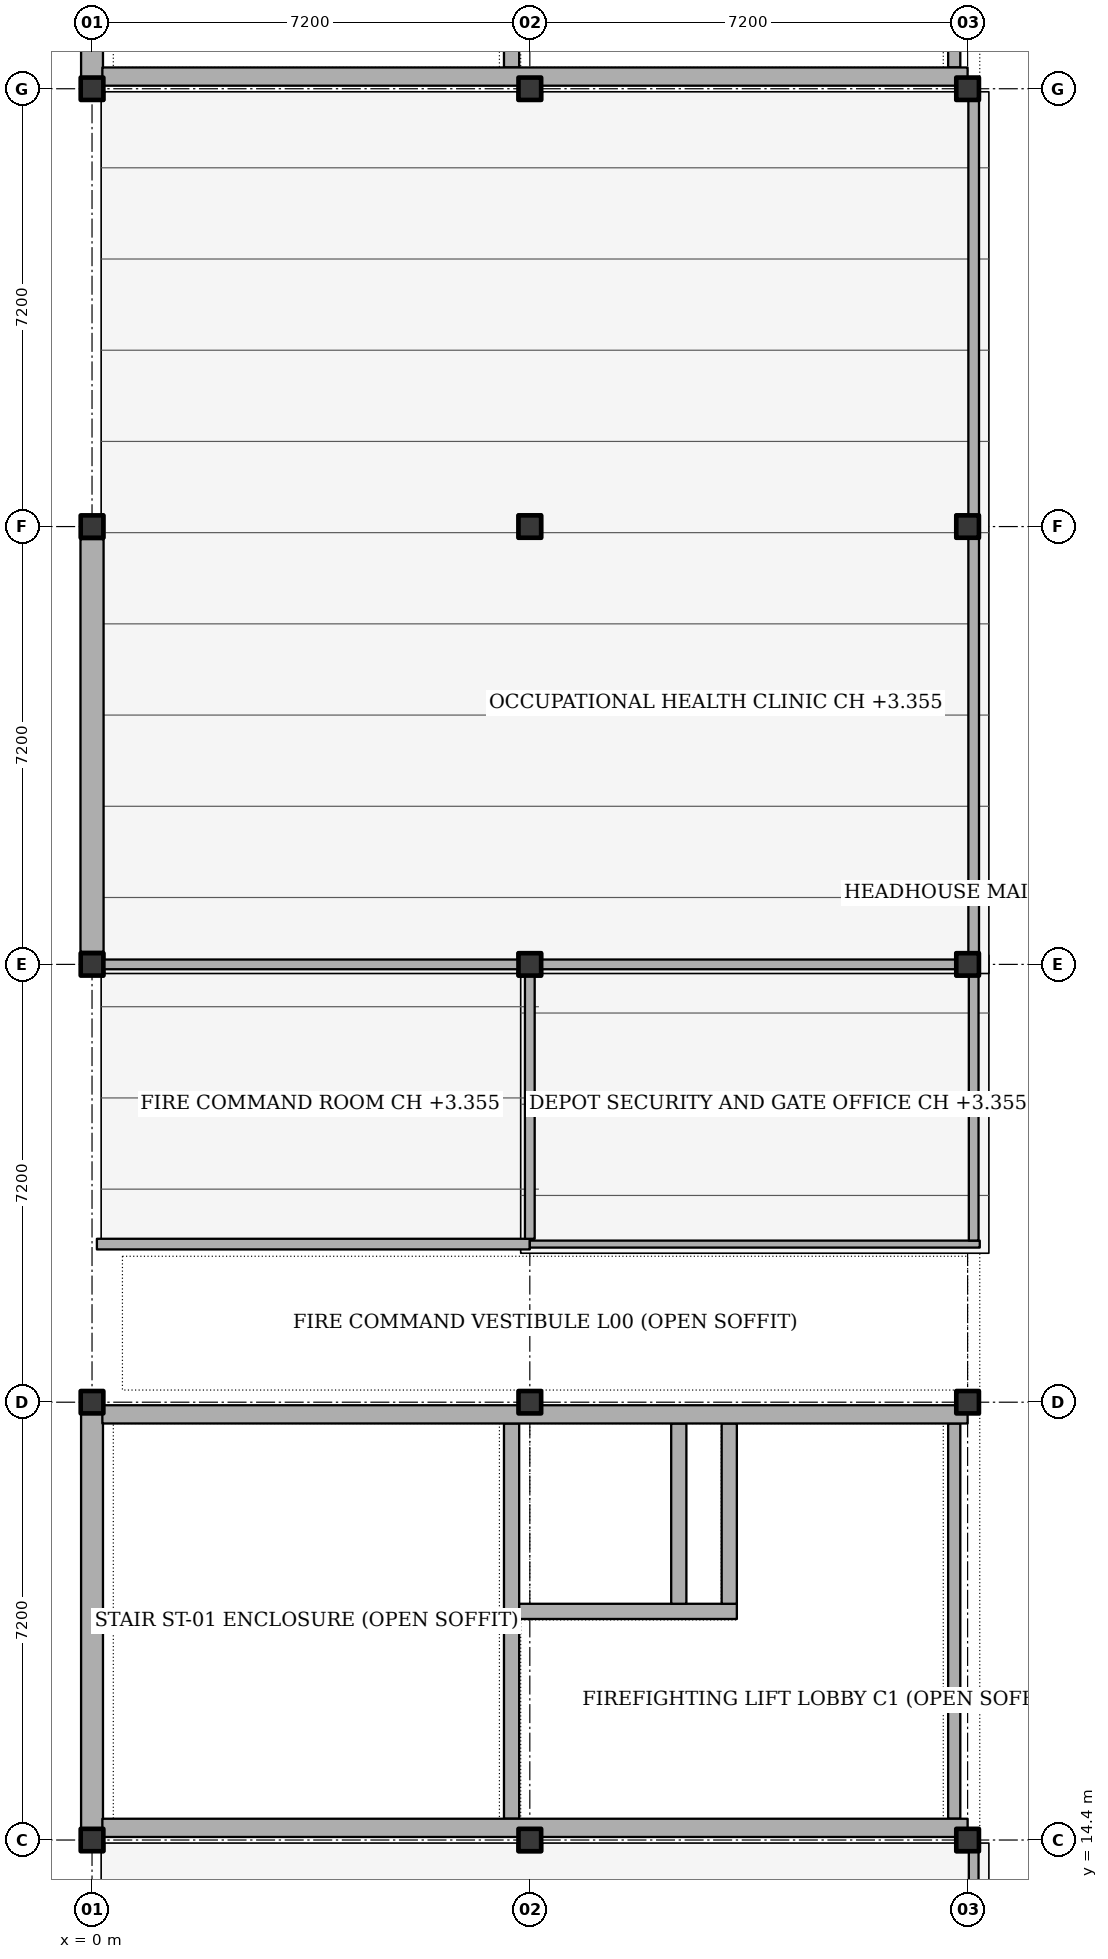
"""IFC4 building model, lengths in metres.
Left out: names, types, materials, properties, quantities, classifications, styles, units other than length and angle.
Written with IfcOpenShell. Run it as: python <this file> out.ifc"""

import sys

from ifc_helpers import new_model, si_unit, direction, frame, frame_2d, origin, origin_2d, place, context, subcontext, project, spatial, rectangle, i_section, extrude, element, fill, save


model = new_model("IFC4")
c1 = context("Model", 3, precision=1e-05, world=origin(), true_north=direction((0.0, 1.0)))
c2 = subcontext(c1, "Body", "Model", "MODEL_VIEW")
j1 = project(units=[si_unit("LENGTHUNIT", "METRE"), si_unit("PLANEANGLEUNIT", "RADIAN")], contexts=[c1])
p1 = place(None, origin())
s1 = spatial("IfcSite", under=j1, at=p1, CompositionType="ELEMENT")
p2 = place(p1, origin())
s2 = spatial("IfcBuilding", under=s1, at=p2, CompositionType="ELEMENT")
p3 = place(p2, origin())
s3 = spatial("IfcBuildingStorey", under=s2, at=p3, CompositionType="ELEMENT", Elevation=0.0)
for number, where, z_axis, x_axis in (
    (1, (0.0, 14.4, -0.3), (0.0, 0.0, 1.0), (1.0, 0.0, 0.0)),
    (2, (0.0, 21.6, -0.3), (0.0, 0.0, 1.0), (1.0, 0.0, 0.0)),
    (3, (0.0, 28.8, -0.3), (0.0, 0.0, 1.0), (1.0, 0.0, 0.0)),
    (4, (0.0, 36.0, -0.3), (0.0, 0.0, 1.0), (1.0, 0.0, 0.0)),
    (5, (0.0, 43.2, -0.3), (0.0, 0.0, 1.0), (1.0, 0.0, 0.0)),
    (6, (7.2, 14.4, -0.3), (0.0, 0.0, 1.0), (1.0, 0.0, 0.0)),
    (7, (7.2, 21.6, -0.3), (0.0, 0.0, 1.0), (1.0, 0.0, 0.0)),
    (8, (7.2, 28.8, -0.3), (0.0, 0.0, 1.0), (1.0, 0.0, 0.0)),
    (9, (7.2, 36.0, -0.3), (0.0, 0.0, 1.0), (1.0, 0.0, 0.0)),
    (10, (7.2, 43.2, -0.3), (0.0, 0.0, 1.0), (1.0, 0.0, 0.0)),
    (11, (14.4, 14.4, -0.3), (0.0, 0.0, 1.0), (1.0, 0.0, 0.0)),
    (12, (14.4, 21.6, -0.3), (0.0, 0.0, 1.0), (1.0, 0.0, 0.0)),
    (13, (14.4, 28.8, -0.3), (0.0, 0.0, 1.0), (1.0, 0.0, 0.0)),
    (14, (14.4, 36.0, -0.3), (0.0, 0.0, 1.0), (1.0, 0.0, 0.0)),
    (15, (14.4, 43.2, -0.3), (0.0, 0.0, 1.0), (1.0, 0.0, 0.0)),
):
    element("IfcColumn", number, at=place(p3, frame(where, z_axis=z_axis, x_axis=x_axis)), inside=s3, PredefinedType="COLUMN", context=c2, shape_type="SweptSolid", body=[
        extrude(i_section(OverallWidth=0.373, OverallDepth=0.368, WebThickness=0.014, FlangeThickness=0.024, FilletRadius=0.015, at=origin_2d()), origin(), (0.0, 0.0, 1.0), 5.7),
    ])
p4 = place(p3, frame((0.0, 14.4, 0.0), z_axis=(0.0, 0.0, 1.0), x_axis=(0.0, 1.0, 0.0)))
e16 = element("IfcWall", 16, at=p4, inside=s3, PredefinedType="SHEAR", context=c2, shape_type="SweptSolid", body=[
    extrude(rectangle(XDim=7.2, YDim=0.36, at=frame_2d((3.6, 0.0))), origin(), (0.0, 0.0, 1.0), 4.594),
])
p5 = place(p4, frame((2.85, 0.0, 0.0)))
e17 = element("IfcOpeningElement", 17, at=p5, cuts=e16, PredefinedType="OPENING", context=c2, shape_type="SweptSolid", body=[
    extrude(rectangle(XDim=1.5, YDim=2.15, at=frame_2d((0.75, 1.075))), frame((0.0, 0.19, 0.0), z_axis=(0.0, -1.0, 0.0), x_axis=(1.0, 0.0, 0.0)), (0.0, 0.0, 1.0), 0.38),
])
p6 = place(p3, frame((0.0, 29.006, 0.0), z_axis=(0.0, 0.0, 1.0), x_axis=(0.0, 1.0, 0.0)))
e18 = element("IfcWall", 18, at=p6, inside=s3, PredefinedType="SOLIDWALL", context=c2, shape_type="SweptSolid", body=[
    extrude(rectangle(XDim=6.787, YDim=0.38, at=frame_2d((3.394, 0.0))), origin(), (0.0, 0.0, 1.0), 4.594),
])
p7 = place(p3, frame((0.0, 43.2, 0.0), z_axis=(0.0, 0.0, 1.0), x_axis=(0.0, 1.0, 0.0)))
e19 = element("IfcWall", 19, at=p7, inside=s3, PredefinedType="SHEAR", context=c2, shape_type="SweptSolid", body=[
    extrude(rectangle(XDim=7.2, YDim=0.36, at=frame_2d((3.6, 0.0))), origin(), (0.0, 0.0, 1.0), 4.594),
])
p8 = place(p7, frame((2.85, 0.0, 0.0)))
e20 = element("IfcOpeningElement", 20, at=p8, cuts=e19, PredefinedType="OPENING", context=c2, shape_type="SweptSolid", body=[
    extrude(rectangle(XDim=1.5, YDim=2.15, at=frame_2d((0.75, 1.075))), frame((0.0, 0.19, 0.0), z_axis=(0.0, -1.0, 0.0), x_axis=(1.0, 0.0, 0.0)), (0.0, 0.0, 1.0), 0.38),
])
p9 = place(p3, frame((6.9, 14.75, 0.0), z_axis=(0.0, 0.0, 1.0), x_axis=(0.0, 1.0, 0.0)))
e21 = element("IfcWall", 21, at=p9, inside=s3, PredefinedType="SHEAR", context=c2, shape_type="SweptSolid", body=[
    extrude(rectangle(XDim=6.5, YDim=0.25, at=frame_2d((3.25, 0.0))), origin(), (0.0, 0.0, 1.0), 4.45),
])
p10 = place(p9, frame((0.95, 0.0, 0.0)))
e22 = element("IfcOpeningElement", 22, at=p10, cuts=e21, PredefinedType="OPENING", context=c2, shape_type="SweptSolid", body=[
    extrude(rectangle(XDim=1.35, YDim=2.15, at=frame_2d((0.675, 1.075))), frame((0.0, 0.135, 0.0), z_axis=(0.0, -1.0, 0.0), x_axis=(1.0, 0.0, 0.0)), (0.0, 0.0, 1.0), 0.27),
])
p11 = place(p3, frame((7.025, 18.16, 0.0), z_axis=(0.0, 0.0, 1.0), x_axis=(1.0, 0.0, 0.0)))
e23 = element("IfcWall", 23, at=p11, inside=s3, PredefinedType="SHEAR", context=c2, shape_type="SweptSolid", body=[
    extrude(rectangle(XDim=3.58, YDim=0.25, at=frame_2d((1.79, 0.0))), origin(), (0.0, 0.0, 1.0), 4.45),
])
p12 = place(p11, frame((0.775, 0.0, 0.0)))
e24 = element("IfcOpeningElement", 24, at=p12, cuts=e23, PredefinedType="OPENING", context=c2, shape_type="SweptSolid", body=[
    extrude(rectangle(XDim=1.1, YDim=2.15, at=frame_2d((0.55, 1.075))), frame((0.0, 0.135, 0.0), z_axis=(0.0, -1.0, 0.0), x_axis=(1.0, 0.0, 0.0)), (0.0, 0.0, 1.0), 0.27),
])
p13 = place(p3, frame((9.65, 18.285, 0.0), z_axis=(0.0, 0.0, 1.0), x_axis=(0.0, 1.0, 0.0)))
e25 = element("IfcWall", 25, at=p13, inside=s3, PredefinedType="SHEAR", context=c2, shape_type="SweptSolid", body=[
    extrude(rectangle(XDim=2.965, YDim=0.25, at=frame_2d((1.482, 0.0))), origin(), (0.0, 0.0, 1.0), 4.45),
])
p14 = place(p3, frame((10.48, 18.285, 0.0), z_axis=(0.0, 0.0, 1.0), x_axis=(0.0, 1.0, 0.0)))
e26 = element("IfcWall", 26, at=p14, inside=s3, PredefinedType="SHEAR", context=c2, shape_type="SweptSolid", body=[
    extrude(rectangle(XDim=2.965, YDim=0.25, at=frame_2d((1.482, 0.0))), origin(), (0.0, 0.0, 1.0), 4.45),
])
p15 = place(p14, frame((0.9, 0.0, 0.0)))
e27 = element("IfcOpeningElement", 27, at=p15, cuts=e26, PredefinedType="OPENING", context=c2, shape_type="SweptSolid", body=[
    extrude(rectangle(XDim=0.92, YDim=2.05, at=frame_2d((0.46, 1.025))), frame((0.0, 0.135, 0.0), z_axis=(0.0, -1.0, 0.0), x_axis=(1.0, 0.0, 0.0)), (0.0, 0.0, 1.0), 0.27),
])
p16 = place(p3, frame((14.18, 14.75, 0.0), z_axis=(0.0, 0.0, 1.0), x_axis=(0.0, 1.0, 0.0)))
e28 = element("IfcWall", 28, at=p16, inside=s3, PredefinedType="SOLIDWALL", context=c2, shape_type="SweptSolid", body=[
    extrude(rectangle(XDim=6.5, YDim=0.2, at=frame_2d((3.25, 0.0))), origin(), (0.0, 0.0, 1.0), 4.45),
])
p17 = place(p16, frame((2.5, 0.0, 0.0)))
e29 = element("IfcOpeningElement", 29, at=p17, cuts=e28, PredefinedType="OPENING", context=c2, shape_type="SweptSolid", body=[
    extrude(rectangle(XDim=1.5, YDim=2.15, at=frame_2d((0.75, 1.075))), frame((0.0, 0.11, 0.0), z_axis=(0.0, -1.0, 0.0), x_axis=(1.0, 0.0, 0.0)), (0.0, 0.0, 1.0), 0.22),
])
for number, where, z_axis, x_axis in (
    (30, (0.17, 14.6, 0.0), (0.0, 0.0, 1.0), (1.0, 0.0, 0.0)),
    (31, (0.17, 21.4, 0.0), (0.0, 0.0, 1.0), (1.0, 0.0, 0.0)),
):
    element("IfcWall", number, at=place(p3, frame(where, z_axis=z_axis, x_axis=x_axis)), inside=s3, PredefinedType="SHEAR", context=c2, shape_type="SweptSolid", body=[
        extrude(rectangle(XDim=14.23, YDim=0.3, at=frame_2d((7.115, 0.0))), origin(), (0.0, 0.0, 1.0), 4.45),
    ])
p18 = place(p3, frame((6.9, 43.55, 0.0), z_axis=(0.0, 0.0, 1.0), x_axis=(0.0, 1.0, 0.0)))
e32 = element("IfcWall", 32, at=p18, inside=s3, PredefinedType="SHEAR", context=c2, shape_type="SweptSolid", body=[
    extrude(rectangle(XDim=6.5, YDim=0.25, at=frame_2d((3.25, 0.0))), origin(), (0.0, 0.0, 1.0), 4.45),
])
p19 = place(p18, frame((0.95, 0.0, 0.0)))
e33 = element("IfcOpeningElement", 33, at=p19, cuts=e32, PredefinedType="OPENING", context=c2, shape_type="SweptSolid", body=[
    extrude(rectangle(XDim=1.35, YDim=2.15, at=frame_2d((0.675, 1.075))), frame((0.0, 0.135, 0.0), z_axis=(0.0, -1.0, 0.0), x_axis=(1.0, 0.0, 0.0)), (0.0, 0.0, 1.0), 0.27),
])
p20 = place(p3, frame((14.18, 43.55, 0.0), z_axis=(0.0, 0.0, 1.0), x_axis=(0.0, 1.0, 0.0)))
e34 = element("IfcWall", 34, at=p20, inside=s3, PredefinedType="SOLIDWALL", context=c2, shape_type="SweptSolid", body=[
    extrude(rectangle(XDim=6.5, YDim=0.2, at=frame_2d((3.25, 0.0))), origin(), (0.0, 0.0, 1.0), 4.45),
])
p21 = place(p20, frame((2.5, 0.0, 0.0)))
e35 = element("IfcOpeningElement", 35, at=p21, cuts=e34, PredefinedType="OPENING", context=c2, shape_type="SweptSolid", body=[
    extrude(rectangle(XDim=1.5, YDim=2.15, at=frame_2d((0.75, 1.075))), frame((0.0, 0.11, 0.0), z_axis=(0.0, -1.0, 0.0), x_axis=(1.0, 0.0, 0.0)), (0.0, 0.0, 1.0), 0.22),
])
p22 = place(p3, frame((0.17, 43.4, 0.0), z_axis=(0.0, 0.0, 1.0), x_axis=(1.0, 0.0, 0.0)))
e36 = element("IfcWall", 36, at=p22, inside=s3, PredefinedType="SHEAR", context=c2, shape_type="SweptSolid", body=[
    extrude(rectangle(XDim=14.23, YDim=0.3, at=frame_2d((7.115, 0.0))), origin(), (0.0, 0.0, 1.0), 4.45),
])
p23 = place(p3, frame((14.5, 7.386, 0.0), z_axis=(0.0, 0.0, 1.0), x_axis=(0.0, 1.0, 0.0)))
e37 = element("IfcWall", 37, at=p23, inside=s3, PredefinedType="PARTITIONING", context=c2, shape_type="SweptSolid", body=[
    extrude(rectangle(XDim=6.828, YDim=0.16, at=frame_2d((3.414, 0.0))), origin(), (0.0, 0.0, 1.0), 3.55),
])
p24 = place(p23, frame((3.534, 0.0, 0.0)))
e38 = element("IfcOpeningElement", 38, at=p24, cuts=e37, PredefinedType="OPENING", context=c2, shape_type="SweptSolid", body=[
    extrude(rectangle(XDim=1.16, YDim=2.14, at=frame_2d((0.58, 1.07))), frame((0.0, 0.09, 0.0), z_axis=(0.0, -1.0, 0.0), x_axis=(1.0, 0.0, 0.0)), (0.0, 0.0, 1.0), 0.18),
])
p25 = place(p3, frame((0.08, 24.2, 0.0), z_axis=(0.0, 0.0, 1.0), x_axis=(1.0, 0.0, 0.0)))
e39 = element("IfcWall", 39, at=p25, inside=s3, PredefinedType="PARTITIONING", context=c2, shape_type="SweptSolid", body=[
    extrude(rectangle(XDim=7.12, YDim=0.175, at=frame_2d((3.56, 0.0))), origin(), (0.0, 0.0, 1.0), 3.55),
])
p26 = place(p25, frame((2.97, 0.0, 0.0)))
e40 = element("IfcOpeningElement", 40, at=p26, cuts=e39, PredefinedType="OPENING", context=c2, shape_type="SweptSolid", body=[
    extrude(rectangle(XDim=1.4, YDim=2.15, at=frame_2d((0.7, 1.075))), frame((0.0, 0.097, 0.0), z_axis=(0.0, -1.0, 0.0), x_axis=(1.0, 0.0, 0.0)), (0.0, 0.0, 1.0), 0.195),
])
p27 = place(p3, frame((7.2, 24.2, 0.0), z_axis=(0.0, 0.0, 1.0), x_axis=(1.0, 0.0, 0.0)))
e41 = element("IfcWall", 41, at=p27, inside=s3, PredefinedType="PARTITIONING", context=c2, shape_type="SweptSolid", body=[
    extrude(rectangle(XDim=7.4, YDim=0.115, at=frame_2d((3.7, 0.0))), origin(), (0.0, 0.0, 1.0), 3.55),
])
p28 = place(p27, frame((3.03, 0.0, 0.0)))
e42 = element("IfcOpeningElement", 42, at=p28, cuts=e41, PredefinedType="OPENING", context=c2, shape_type="SweptSolid", body=[
    extrude(rectangle(XDim=1.34, YDim=2.2, at=frame_2d((0.67, 1.1))), frame((0.0, 0.067, 0.0), z_axis=(0.0, -1.0, 0.0), x_axis=(1.0, 0.0, 0.0)), (0.0, 0.0, 1.0), 0.135),
])
p29 = place(p3, frame((14.5, 28.986, 0.0), z_axis=(0.0, 0.0, 1.0), x_axis=(0.0, 1.0, 0.0)))
e43 = element("IfcWall", 43, at=p29, inside=s3, PredefinedType="PARTITIONING", context=c2, shape_type="SweptSolid", body=[
    extrude(rectangle(XDim=6.828, YDim=0.175, at=frame_2d((3.414, 0.0))), origin(), (0.0, 0.0, 1.0), 3.55),
])
p30 = place(p29, frame((2.691, 0.0, 0.0)))
e44 = element("IfcOpeningElement", 44, at=p30, cuts=e43, PredefinedType="OPENING", context=c2, shape_type="SweptSolid", body=[
    extrude(rectangle(XDim=1.46, YDim=2.04, at=frame_2d((0.73, 1.02))), frame((0.0, 0.097, 0.0), z_axis=(0.0, -1.0, 0.0), x_axis=(1.0, 0.0, 0.0)), (0.0, 0.0, 1.0), 0.195),
])
p31 = place(p3, frame((14.5, 36.186, 0.0), z_axis=(0.0, 0.0, 1.0), x_axis=(0.0, 1.0, 0.0)))
e45 = element("IfcWall", 45, at=p31, inside=s3, PredefinedType="PARTITIONING", context=c2, shape_type="SweptSolid", body=[
    extrude(rectangle(XDim=6.828, YDim=0.175, at=frame_2d((3.414, 0.0))), origin(), (0.0, 0.0, 1.0), 3.55),
])
p32 = place(p3, frame((7.2, 24.287, 0.0), z_axis=(0.0, 0.0, 1.0), x_axis=(0.0, 1.0, 0.0)))
e46 = element("IfcWall", 46, at=p32, inside=s3, PredefinedType="PARTITIONING", context=c2, shape_type="SweptSolid", body=[
    extrude(rectangle(XDim=4.327, YDim=0.16, at=frame_2d((2.164, 0.0))), origin(), (0.0, 0.0, 1.0), 3.55),
])
p33 = place(p3, frame((0.19, 28.8, 0.0), z_axis=(0.0, 0.0, 1.0), x_axis=(1.0, 0.0, 0.0)))
e47 = element("IfcWall", 47, at=p33, inside=s3, PredefinedType="PARTITIONING", context=c2, shape_type="SweptSolid", body=[
    extrude(rectangle(XDim=6.822, YDim=0.16, at=frame_2d((3.411, 0.0))), origin(), (0.0, 0.0, 1.0), 3.55),
])
p34 = place(p3, frame((14.5, 24.258, 0.0), z_axis=(0.0, 0.0, 1.0), x_axis=(0.0, 1.0, 0.0)))
e48 = element("IfcWall", 48, at=p34, inside=s3, PredefinedType="PARTITIONING", context=c2, shape_type="SweptSolid", body=[
    extrude(rectangle(XDim=4.356, YDim=0.16, at=frame_2d((2.178, 0.0))), origin(), (0.0, 0.0, 1.0), 3.55),
])
p35 = place(p3, frame((7.388, 28.8, 0.0), z_axis=(0.0, 0.0, 1.0), x_axis=(1.0, 0.0, 0.0)))
e49 = element("IfcWall", 49, at=p35, inside=s3, PredefinedType="PARTITIONING", context=c2, shape_type="SweptSolid", body=[
    extrude(rectangle(XDim=6.824, YDim=0.16, at=frame_2d((3.412, 0.0))), origin(), (0.0, 0.0, 1.0), 3.55),
])
p36 = place(p5, origin())
e50 = element("IfcDoor", 50, at=p36, inside=s3, OperationType="SINGLE_SWING_LEFT", PredefinedType="DOOR", context=c2, shape_type="SweptSolid", body=[
    extrude(rectangle(XDim=1.5, YDim=2.15, at=frame_2d((0.75, 1.075))), frame((0.0, 0.025, 0.0), z_axis=(0.0, -1.0, 0.0), x_axis=(1.0, 0.0, 0.0)), (0.0, 0.0, 1.0), 0.05),
])
fill(e17, e50)
p37 = place(p10, origin())
e51 = element("IfcDoor", 51, at=p37, inside=s3, OperationType="SINGLE_SWING_RIGHT", PredefinedType="DOOR", context=c2, shape_type="SweptSolid", body=[
    extrude(rectangle(XDim=1.35, YDim=2.15, at=frame_2d((0.675, 1.075))), frame((0.0, 0.025, 0.0), z_axis=(0.0, -1.0, 0.0), x_axis=(1.0, 0.0, 0.0)), (0.0, 0.0, 1.0), 0.05),
])
fill(e22, e51)
p38 = place(p12, origin())
e52 = element("IfcDoor", 52, at=p38, inside=s3, OperationType="SLIDING_TO_LEFT", PredefinedType="DOOR", context=c2, shape_type="SweptSolid", body=[
    extrude(rectangle(XDim=1.1, YDim=2.15, at=frame_2d((0.55, 1.075))), frame((0.0, 0.025, 0.0), z_axis=(0.0, -1.0, 0.0), x_axis=(1.0, 0.0, 0.0)), (0.0, 0.0, 1.0), 0.05),
])
fill(e24, e52)
p39 = place(p15, origin())
e53 = element("IfcDoor", 53, at=p39, inside=s3, OperationType="SINGLE_SWING_LEFT", PredefinedType="DOOR", context=c2, shape_type="SweptSolid", body=[
    extrude(rectangle(XDim=0.92, YDim=2.05, at=frame_2d((0.46, 1.025))), frame((0.0, 0.025, 0.0), z_axis=(0.0, -1.0, 0.0), x_axis=(1.0, 0.0, 0.0)), (0.0, 0.0, 1.0), 0.05),
])
fill(e27, e53)
p40 = place(p17, origin())
e54 = element("IfcDoor", 54, at=p40, inside=s3, OperationType="SINGLE_SWING_RIGHT", PredefinedType="DOOR", context=c2, shape_type="SweptSolid", body=[
    extrude(rectangle(XDim=1.5, YDim=2.15, at=frame_2d((0.75, 1.075))), frame((0.0, 0.025, 0.0), z_axis=(0.0, -1.0, 0.0), x_axis=(1.0, 0.0, 0.0)), (0.0, 0.0, 1.0), 0.05),
])
fill(e29, e54)
p41 = place(p26, origin())
e55 = element("IfcDoor", 55, at=p41, inside=s3, OperationType="SINGLE_SWING_LEFT", PredefinedType="DOOR", context=c2, shape_type="SweptSolid", body=[
    extrude(rectangle(XDim=1.4, YDim=2.15, at=frame_2d((0.7, 1.075))), frame((0.0, 0.025, 0.0), z_axis=(0.0, -1.0, 0.0), x_axis=(1.0, 0.0, 0.0)), (0.0, 0.0, 1.0), 0.05),
])
fill(e40, e55)
p42 = place(p28, origin())
e56 = element("IfcDoor", 56, at=p42, inside=s3, OperationType="SINGLE_SWING_RIGHT", PredefinedType="DOOR", context=c2, shape_type="SweptSolid", body=[
    extrude(rectangle(XDim=1.34, YDim=2.2, at=frame_2d((0.67, 1.1))), frame((0.0, 0.025, 0.0), z_axis=(0.0, -1.0, 0.0), x_axis=(1.0, 0.0, 0.0)), (0.0, 0.0, 1.0), 0.05),
])
fill(e42, e56)
p43 = place(p30, origin())
e57 = element("IfcDoor", 57, at=p43, inside=s3, OperationType="SINGLE_SWING_RIGHT", PredefinedType="DOOR", context=c2, shape_type="SweptSolid", body=[
    extrude(rectangle(XDim=1.46, YDim=2.04, at=frame_2d((0.73, 1.02))), frame((0.0, 0.025, 0.0), z_axis=(0.0, -1.0, 0.0), x_axis=(1.0, 0.0, 0.0)), (0.0, 0.0, 1.0), 0.05),
])
fill(e44, e57)
save(model, sys.argv[1])
